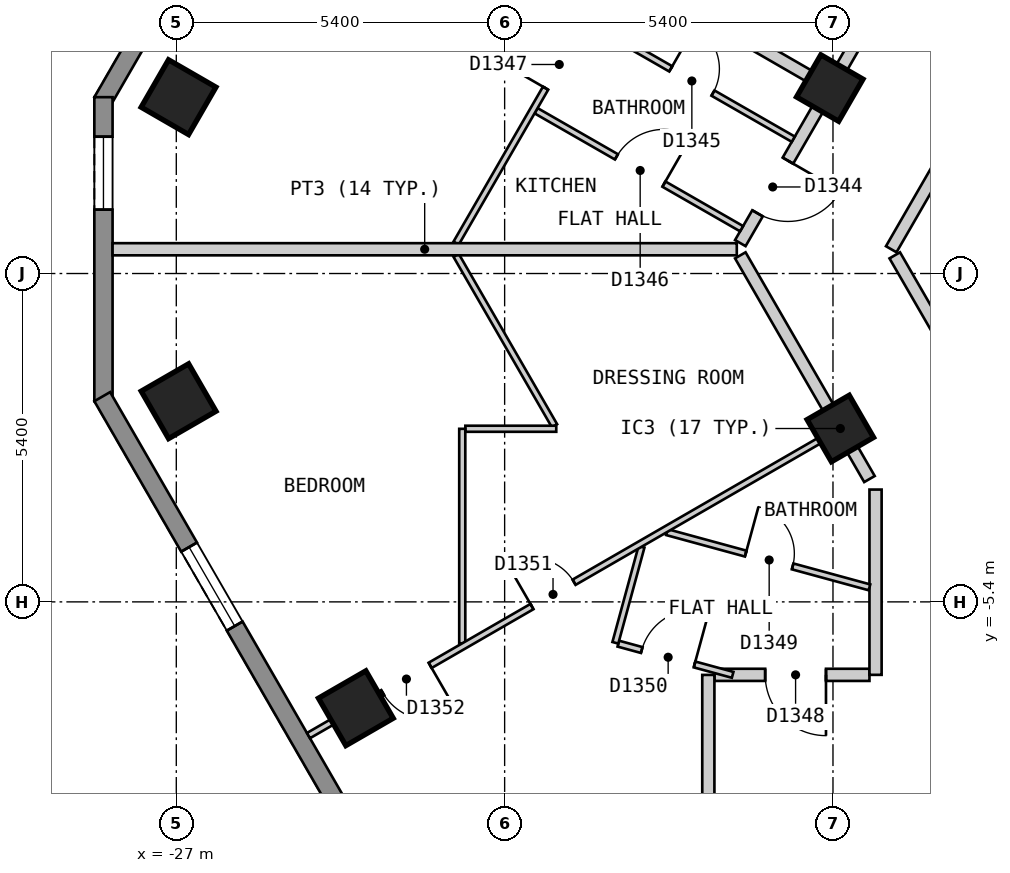
"""IFC4 building model, lengths in metres.
Left out: names, types, materials, properties, quantities, classifications, styles, units other than length and angle.
Written with IfcOpenShell. Run it as: python <this file> out.ifc"""

import sys

from ifc_helpers import new_model, si_unit, direction, frame, frame_2d, origin, origin_2d, place, context, subcontext, project, spatial, polyline, rectangle, outline, extrude, element, fill, save


model = new_model("IFC4")
c1 = context("Model", 3, precision=1e-05, world=origin(), true_north=direction((0.0, 1.0)))
c2 = subcontext(c1, "Body", "Model", "MODEL_VIEW")
j1 = project(units=[si_unit("LENGTHUNIT", "METRE"), si_unit("PLANEANGLEUNIT", "RADIAN")], contexts=[c1])
p1 = place(None, origin())
s1 = spatial("IfcSite", under=j1, at=p1, CompositionType="ELEMENT")
p2 = place(p1, origin())
s2 = spatial("IfcBuilding", under=s1, at=p2, CompositionType="ELEMENT")
p3 = place(p2, frame((0.0, 0.0, 147.6)))
s3 = spatial("IfcBuildingStorey", under=s2, at=p3, CompositionType="ELEMENT", Elevation=147.6)
for number, where, z_axis, x_axis in (
    (1, (-26.963, 2.9, 0.0), (0.0, 0.0, 1.0), (-0.5, -0.866, 0.0)),
    (2, (-26.962, -2.1, 0.0), (0.0, 0.0, 1.0), (0.5, -0.866, 0.0)),
    (3, (-24.047, -7.149, 0.0), (0.0, 0.0, 1.0), (0.5, -0.866, 0.0)),
):
    element("IfcColumn", number, at=place(p3, frame(where, z_axis=z_axis, x_axis=x_axis)), inside=s3, PredefinedType="COLUMN", context=c2, shape_type="SweptSolid", body=[
        extrude(rectangle(XDim=0.9, YDim=0.9, at=origin_2d()), origin(), (0.0, 0.0, 1.0), 3.0),
    ])
for number, where, z_axis, x_axis in (
    (4, (-16.079, -2.549, 0.0), (0.0, 0.0, 1.0), (0.5, -0.866, 0.0)),
    (5, (-16.253, 3.05, 0.0), (0.0, 0.0, 1.0), (-0.5, -0.866, 0.0)),
):
    element("IfcColumn", number, at=place(p3, frame(where, z_axis=z_axis, x_axis=x_axis)), inside=s3, PredefinedType="COLUMN", context=c2, shape_type="SweptSolid", body=[
        extrude(rectangle(XDim=0.8, YDim=0.8, at=origin_2d()), origin(), (0.0, 0.0, 1.0), 3.0),
    ])
p4 = place(p3, frame((-16.555, 23.025, 0.0), z_axis=(0.0, 0.0, 1.0), x_axis=(-0.500020536353, -0.866013546791, 0.0)))
e6 = element("IfcWall", 6, at=p4, inside=s3, PredefinedType="SOLIDWALL", context=c2, shape_type="SweptSolid", body=[
    extrude(outline(polyline([(0.0, -0.15), (23.325, -0.15), (23.245, 0.15), (0.08, 0.15), (0.0, -0.15)])), origin(), (0.0, 0.0, 1.0), 2.7),
])
p5 = place(p4, frame((2.685, 0.0, 0.15)))
e7 = element("IfcOpeningElement", 7, at=p5, cuts=e6, PredefinedType="OPENING", context=c2, shape_type="SweptSolid", body=[
    extrude(rectangle(XDim=1.5, YDim=2.1, at=frame_2d((0.75, 1.05))), frame((0.0, 0.16, 0.0), z_axis=(0.0, -1.0, 0.0), x_axis=(1.0, 0.0, 0.0)), (0.0, 0.0, 1.0), 0.32),
])
p6 = place(p4, frame((8.171, 0.0, 0.15)))
e8 = element("IfcOpeningElement", 8, at=p6, cuts=e6, PredefinedType="OPENING", context=c2, shape_type="SweptSolid", body=[
    extrude(rectangle(XDim=1.5, YDim=2.1, at=frame_2d((0.75, 1.05))), frame((0.0, 0.16, 0.0), z_axis=(0.0, -1.0, 0.0), x_axis=(1.0, 0.0, 0.0)), (0.0, 0.0, 1.0), 0.32),
])
p7 = place(p4, frame((13.655, 0.0, 0.15)))
e9 = element("IfcOpeningElement", 9, at=p7, cuts=e6, PredefinedType="OPENING", context=c2, shape_type="SweptSolid", body=[
    extrude(rectangle(XDim=1.5, YDim=2.1, at=frame_2d((0.75, 1.05))), frame((0.0, 0.16, 0.0), z_axis=(0.0, -1.0, 0.0), x_axis=(1.0, 0.0, 0.0)), (0.0, 0.0, 1.0), 0.32),
])
p8 = place(p4, frame((19.14, 0.0, 0.15)))
e10 = element("IfcOpeningElement", 10, at=p8, cuts=e6, PredefinedType="OPENING", context=c2, shape_type="SweptSolid", body=[
    extrude(rectangle(XDim=1.5, YDim=2.1, at=frame_2d((0.75, 1.05))), frame((0.0, 0.16, 0.0), z_axis=(0.0, -1.0, 0.0), x_axis=(1.0, 0.0, 0.0)), (0.0, 0.0, 1.0), 0.32),
])
p9 = place(p3, frame((-28.198, 2.9, 0.0), z_axis=(0.0, 0.0, 1.0), x_axis=(0.0, -1.0, 0.0)))
e11 = element("IfcWall", 11, at=p9, inside=s3, PredefinedType="SOLIDWALL", context=c2, shape_type="SweptSolid", body=[
    extrude(outline(polyline([(0.0, -0.15), (5.0, -0.15), (4.92, 0.15), (0.08, 0.15), (0.0, -0.15)])), origin(), (0.0, 0.0, 1.0), 2.7),
])
p10 = place(p9, frame((0.65, 0.0, 0.15)))
e12 = element("IfcOpeningElement", 12, at=p10, cuts=e11, PredefinedType="OPENING", context=c2, shape_type="SweptSolid", body=[
    extrude(rectangle(XDim=1.2, YDim=2.1, at=frame_2d((0.6, 1.05))), frame((0.0, 0.16, 0.0), z_axis=(0.0, -1.0, 0.0), x_axis=(1.0, 0.0, 0.0)), (0.0, 0.0, 1.0), 0.32),
])
p11 = place(p3, frame((-28.218, -2.025, 0.0), z_axis=(0.0, 0.0, 1.0), x_axis=(0.500017503135, -0.866015298109, 0.0)))
e13 = element("IfcWall", 13, at=p11, inside=s3, PredefinedType="SOLIDWALL", context=c2, shape_type="SweptSolid", body=[
    extrude(outline(polyline([(0.0, -0.15), (24.711, -0.15), (24.631, 0.15), (0.08, 0.15), (0.0, -0.15)])), origin(), (0.0, 0.0, 1.0), 2.7),
])
p12 = place(p11, frame((2.857, 0.0, 0.15)))
e14 = element("IfcOpeningElement", 14, at=p12, cuts=e13, PredefinedType="OPENING", context=c2, shape_type="SweptSolid", body=[
    extrude(rectangle(XDim=1.5, YDim=2.1, at=frame_2d((0.75, 1.05))), frame((0.0, 0.16, 0.0), z_axis=(0.0, -1.0, 0.0), x_axis=(1.0, 0.0, 0.0)), (0.0, 0.0, 1.0), 0.32),
])
p13 = place(p11, frame((8.689, 0.0, 0.15)))
e15 = element("IfcOpeningElement", 15, at=p13, cuts=e13, PredefinedType="OPENING", context=c2, shape_type="SweptSolid", body=[
    extrude(rectangle(XDim=1.5, YDim=2.1, at=frame_2d((0.75, 1.05))), frame((0.0, 0.16, 0.0), z_axis=(0.0, -1.0, 0.0), x_axis=(1.0, 0.0, 0.0)), (0.0, 0.0, 1.0), 0.32),
])
p14 = place(p11, frame((14.52, 0.0, 0.15)))
e16 = element("IfcOpeningElement", 16, at=p14, cuts=e13, PredefinedType="OPENING", context=c2, shape_type="SweptSolid", body=[
    extrude(rectangle(XDim=1.5, YDim=2.1, at=frame_2d((0.75, 1.05))), frame((0.0, 0.16, 0.0), z_axis=(0.0, -1.0, 0.0), x_axis=(1.0, 0.0, 0.0)), (0.0, 0.0, 1.0), 0.32),
])
p15 = place(p11, frame((20.351, 0.0, 0.15)))
e17 = element("IfcOpeningElement", 17, at=p15, cuts=e13, PredefinedType="OPENING", context=c2, shape_type="SweptSolid", body=[
    extrude(rectangle(XDim=1.5, YDim=2.1, at=frame_2d((0.75, 1.05))), frame((0.0, 0.16, 0.0), z_axis=(0.0, -1.0, 0.0), x_axis=(1.0, 0.0, 0.0)), (0.0, 0.0, 1.0), 0.32),
])
p16 = place(p3, frame((-15.184, 0.299, 0.0), z_axis=(0.0, 0.0, 1.0), x_axis=(0.500149577091, -0.865939028186, 0.0)))
e18 = element("IfcWall", 18, at=p16, inside=s3, PredefinedType="PARTITIONING", context=c2, shape_type="SweptSolid", body=[
    extrude(rectangle(XDim=3.463, YDim=0.2, at=frame_2d((1.732, 0.0))), origin(), (0.0, 0.0, 1.0), 2.7),
])
p17 = place(p3, frame((-17.724, 0.299, 0.0), z_axis=(0.0, 0.0, 1.0), x_axis=(0.499923815713, -0.866069384335, 0.0)))
e19 = element("IfcWall", 19, at=p17, inside=s3, PredefinedType="PARTITIONING", context=c2, shape_type="SweptSolid", body=[
    extrude(rectangle(XDim=3.289, YDim=0.2, at=frame_2d((1.644, 0.0))), origin(), (0.0, 0.0, 1.0), 2.7),
])
p18 = place(p3, frame((-16.02, -2.652, 0.0), z_axis=(0.0, 0.0, 1.0), x_axis=(0.499764376199, -0.866161398518, 0.0)))
e20 = element("IfcWall", 20, at=p18, inside=s3, PredefinedType="PARTITIONING", context=c2, shape_type="SweptSolid", body=[
    extrude(rectangle(XDim=0.84, YDim=0.2, at=frame_2d((0.42, 0.0))), origin(), (0.0, 0.0, 1.0), 2.7),
])
p19 = place(p3, frame((-18.149, -6.6, 0.0), z_axis=(0.0, 0.0, 1.0), x_axis=(1.0, 0.0, 0.0)))
e21 = element("IfcWall", 21, at=p19, inside=s3, PredefinedType="PARTITIONING", context=c2, shape_type="SweptSolid", body=[
    extrude(rectangle(XDim=2.549, YDim=0.2, at=frame_2d((1.274, 0.0))), origin(), (0.0, 0.0, 1.0), 2.7),
])
p20 = place(p19, frame((0.834, 0.0, 0.0)))
e22 = element("IfcOpeningElement", 22, at=p20, cuts=e21, PredefinedType="OPENING", context=c2, shape_type="SweptSolid", body=[
    extrude(rectangle(XDim=1.0, YDim=2.1, at=frame_2d((0.5, 1.05))), frame((0.0, 0.11, 0.0), z_axis=(0.0, -1.0, 0.0), x_axis=(1.0, 0.0, 0.0)), (0.0, 0.0, 1.0), 0.22),
])
p21 = place(p3, frame((-15.242, 0.399, 0.0), z_axis=(0.0, 0.0, 1.0), x_axis=(0.499953615651, 0.866052182145, 0.0)))
e23 = element("IfcWall", 23, at=p21, inside=s3, PredefinedType="PARTITIONING", context=c2, shape_type="SweptSolid", body=[
    extrude(rectangle(XDim=8.777, YDim=0.2, at=frame_2d((4.388, 0.0))), origin(), (0.0, 0.0, 1.0), 2.7),
])
p22 = place(p21, frame((3.938, 0.0, 0.0)))
e24 = element("IfcOpeningElement", 24, at=p22, cuts=e23, PredefinedType="OPENING", context=c2, shape_type="SweptSolid", body=[
    extrude(rectangle(XDim=0.9, YDim=2.1, at=frame_2d((0.45, 1.05))), frame((0.0, 0.11, 0.0), z_axis=(0.0, -1.0, 0.0), x_axis=(1.0, 0.0, 0.0)), (0.0, 0.0, 1.0), 0.22),
])
p23 = place(p3, frame((-17.724, 0.5, 0.0), z_axis=(0.0, 0.0, 1.0), x_axis=(0.499994801602, 0.86602840506, 0.0)))
e25 = element("IfcWall", 25, at=p23, inside=s3, PredefinedType="PARTITIONING", context=c2, shape_type="SweptSolid", body=[
    extrude(rectangle(XDim=16.916, YDim=0.2, at=frame_2d((8.458, 0.0))), origin(), (0.0, 0.0, 1.0), 2.7),
])
p24 = place(p23, frame((10.672, 0.0, 0.0)))
e26 = element("IfcOpeningElement", 26, at=p24, cuts=e25, PredefinedType="OPENING", context=c2, shape_type="SweptSolid", body=[
    extrude(rectangle(XDim=1.0, YDim=2.1, at=frame_2d((0.5, 1.05))), frame((0.0, 0.11, 0.0), z_axis=(0.0, -1.0, 0.0), x_axis=(1.0, 0.0, 0.0)), (0.0, 0.0, 1.0), 0.22),
])
p25 = place(p23, frame((5.187, 0.0, 0.0)))
e27 = element("IfcOpeningElement", 27, at=p25, cuts=e25, PredefinedType="OPENING", context=c2, shape_type="SweptSolid", body=[
    extrude(rectangle(XDim=1.0, YDim=2.1, at=frame_2d((0.5, 1.05))), frame((0.0, 0.11, 0.0), z_axis=(0.0, -1.0, 0.0), x_axis=(1.0, 0.0, 0.0)), (0.0, 0.0, 1.0), 0.22),
])
p26 = place(p23, frame((0.566, 0.0, 0.0)))
e28 = element("IfcOpeningElement", 28, at=p26, cuts=e25, PredefinedType="OPENING", context=c2, shape_type="SweptSolid", body=[
    extrude(rectangle(XDim=1.0, YDim=2.1, at=frame_2d((0.5, 1.05))), frame((0.0, 0.11, 0.0), z_axis=(0.0, -1.0, 0.0), x_axis=(1.0, 0.0, 0.0)), (0.0, 0.0, 1.0), 0.22),
])
p27 = place(p3, frame((-15.5, -6.6, 0.0), z_axis=(0.0, 0.0, 1.0), x_axis=(0.0, 1.0, 0.0)))
e29 = element("IfcWall", 29, at=p27, inside=s3, PredefinedType="PARTITIONING", context=c2, shape_type="SweptSolid", body=[
    extrude(rectangle(XDim=3.047, YDim=0.2, at=frame_2d((1.523, 0.0))), origin(), (0.0, 0.0, 1.0), 2.7),
])
p28 = place(p3, frame((-18.25, -16.4, 0.0), z_axis=(0.0, 0.0, 1.0), x_axis=(0.0, 1.0, 0.0)))
e30 = element("IfcWall", 30, at=p28, inside=s3, PredefinedType="PARTITIONING", context=c2, shape_type="SweptSolid", body=[
    extrude(rectangle(XDim=9.799, YDim=0.2, at=frame_2d((4.899, 0.0))), origin(), (0.0, 0.0, 1.0), 2.7),
])
p29 = place(p28, frame((2.485, 0.0, 0.0)))
e31 = element("IfcOpeningElement", 31, at=p29, cuts=e30, PredefinedType="OPENING", context=c2, shape_type="SweptSolid", body=[
    extrude(rectangle(XDim=0.8, YDim=2.1, at=frame_2d((0.4, 1.05))), frame((0.0, 0.11, 0.0), z_axis=(0.0, -1.0, 0.0), x_axis=(1.0, 0.0, 0.0)), (0.0, 0.0, 1.0), 0.22),
])
p30 = place(p3, frame((-22.398, 0.299, 0.0), z_axis=(0.0, 0.0, 1.0), x_axis=(0.50004249738, -0.86600086652, 0.0)))
e32 = element("IfcWall", 32, at=p30, inside=s3, PredefinedType="PARTITIONING", context=c2, shape_type="SweptSolid", body=[
    extrude(rectangle(XDim=3.236, YDim=0.1, at=frame_2d((1.618, 0.0))), origin(), (0.0, 0.0, 1.0), 2.7),
])
p31 = place(p3, frame((-18.931, -4.253, 0.0), z_axis=(0.0, 0.0, 1.0), x_axis=(0.96479645258, -0.262997728296, 0.0)))
e33 = element("IfcWall", 33, at=p31, inside=s3, PredefinedType="PARTITIONING", context=c2, shape_type="SweptSolid", body=[
    extrude(rectangle(XDim=3.452, YDim=0.1, at=frame_2d((1.726, 0.0))), origin(), (0.0, 0.0, 1.0), 2.7),
])
p32 = place(p31, frame((1.343, 0.0, 0.0)))
e34 = element("IfcOpeningElement", 34, at=p32, cuts=e33, PredefinedType="OPENING", context=c2, shape_type="SweptSolid", body=[
    extrude(rectangle(XDim=0.8, YDim=2.1, at=frame_2d((0.4, 1.05))), frame((0.0, 0.06, 0.0), z_axis=(0.0, -1.0, 0.0), x_axis=(1.0, 0.0, 0.0)), (0.0, 0.0, 1.0), 0.12),
])
p33 = place(p3, frame((-19.73, -6.087, 0.0), z_axis=(0.0, 0.0, 1.0), x_axis=(0.964700186442, -0.263350622325, 0.0)))
e35 = element("IfcWall", 35, at=p33, inside=s3, PredefinedType="PARTITIONING", context=c2, shape_type="SweptSolid", body=[
    extrude(rectangle(XDim=1.949, YDim=0.1, at=frame_2d((0.974, 0.0))), origin(), (0.0, 0.0, 1.0), 2.7),
])
p34 = place(p33, frame((0.399, 0.0, 0.0)))
e36 = element("IfcOpeningElement", 36, at=p34, cuts=e35, PredefinedType="OPENING", context=c2, shape_type="SweptSolid", body=[
    extrude(rectangle(XDim=0.9, YDim=2.1, at=frame_2d((0.45, 1.05))), frame((0.0, 0.06, 0.0), z_axis=(0.0, -1.0, 0.0), x_axis=(1.0, 0.0, 0.0)), (0.0, 0.0, 1.0), 0.12),
])
p35 = place(p3, frame((-20.233, 4.149, 0.0), z_axis=(0.0, 0.0, 1.0), x_axis=(0.867293167797, -0.497797711016, 0.0)))
e37 = element("IfcWall", 37, at=p35, inside=s3, PredefinedType="PARTITIONING", context=c2, shape_type="SweptSolid", body=[
    extrude(rectangle(XDim=3.897, YDim=0.1, at=frame_2d((1.948, 0.0))), origin(), (0.0, 0.0, 1.0), 2.7),
])
p36 = place(p35, frame((1.574, 0.0, 0.0)))
e38 = element("IfcOpeningElement", 38, at=p36, cuts=e37, PredefinedType="OPENING", context=c2, shape_type="SweptSolid", body=[
    extrude(rectangle(XDim=0.8, YDim=2.1, at=frame_2d((0.4, 1.05))), frame((0.0, 0.06, 0.0), z_axis=(0.0, -1.0, 0.0), x_axis=(1.0, 0.0, 0.0)), (0.0, 0.0, 1.0), 0.12),
])
p37 = place(p3, frame((-21.083, 2.677, 0.0), z_axis=(0.0, 0.0, 1.0), x_axis=(0.867308690764, -0.497770664991, 0.0)))
e39 = element("IfcWall", 39, at=p37, inside=s3, PredefinedType="PARTITIONING", context=c2, shape_type="SweptSolid", body=[
    extrude(rectangle(XDim=3.897, YDim=0.1, at=frame_2d((1.949, 0.0))), origin(), (0.0, 0.0, 1.0), 2.7),
])
p38 = place(p37, frame((1.524, 0.0, 0.0)))
e40 = element("IfcOpeningElement", 40, at=p38, cuts=e39, PredefinedType="OPENING", context=c2, shape_type="SweptSolid", body=[
    extrude(rectangle(XDim=0.9, YDim=2.1, at=frame_2d((0.45, 1.05))), frame((0.0, 0.06, 0.0), z_axis=(0.0, -1.0, 0.0), x_axis=(1.0, 0.0, 0.0)), (0.0, 0.0, 1.0), 0.12),
])
p39 = place(p3, frame((-22.246, -2.553, 0.0), z_axis=(0.0, 0.0, 1.0), x_axis=(1.0, 0.0, 0.0)))
e41 = element("IfcWall", 41, at=p39, inside=s3, PredefinedType="PARTITIONING", context=c2, shape_type="SweptSolid", body=[
    extrude(rectangle(XDim=1.495, YDim=0.1, at=frame_2d((0.748, 0.0))), origin(), (0.0, 0.0, 1.0), 2.7),
])
p40 = place(p3, frame((-22.398, 0.499, 0.0), z_axis=(0.0, 0.0, 1.0), x_axis=(0.499984806807, 0.866034175401, 0.0)))
e42 = element("IfcWall", 42, at=p40, inside=s3, PredefinedType="PARTITIONING", context=c2, shape_type="SweptSolid", body=[
    extrude(rectangle(XDim=5.182, YDim=0.1, at=frame_2d((2.591, 0.0))), origin(), (0.0, 0.0, 1.0), 2.7),
])
p41 = place(p40, frame((2.943, 0.0, 0.0)))
e43 = element("IfcOpeningElement", 43, at=p41, cuts=e42, PredefinedType="OPENING", context=c2, shape_type="SweptSolid", body=[
    extrude(rectangle(XDim=0.9, YDim=2.1, at=frame_2d((0.45, 1.05))), frame((0.0, 0.06, 0.0), z_axis=(0.0, -1.0, 0.0), x_axis=(1.0, 0.0, 0.0)), (0.0, 0.0, 1.0), 0.12),
])
p42 = place(p3, frame((-19.779, -6.073, 0.0), z_axis=(0.0, 0.0, 1.0), x_axis=(0.262700832967, 0.964877335395, 0.0)))
e44 = element("IfcWall", 44, at=p42, inside=s3, PredefinedType="PARTITIONING", context=c2, shape_type="SweptSolid", body=[
    extrude(rectangle(XDim=1.636, YDim=0.1, at=frame_2d((0.818, 0.0))), origin(), (0.0, 0.0, 1.0), 2.7),
])
p43 = place(p3, frame((-22.297, -6.081, 0.0), z_axis=(0.0, 0.0, 1.0), x_axis=(0.0, 1.0, 0.0)))
e45 = element("IfcWall", 45, at=p43, inside=s3, PredefinedType="PARTITIONING", context=c2, shape_type="SweptSolid", body=[
    extrude(rectangle(XDim=3.527, YDim=0.1, at=frame_2d((1.764, 0.0))), origin(), (0.0, 0.0, 1.0), 2.7),
])
p44 = place(p3, frame((-24.826, -7.599, 0.0), z_axis=(0.0, 0.0, 1.0), x_axis=(0.866020686789, 0.500008169986, 0.0)))
e46 = element("IfcWall", 46, at=p44, inside=s3, PredefinedType="PARTITIONING", context=c2, shape_type="SweptSolid", body=[
    extrude(rectangle(XDim=10.01, YDim=0.1, at=frame_2d((5.005, 0.0))), origin(), (0.0, 0.0, 1.0), 2.7),
])
p45 = place(p44, frame((4.244, 0.0, 0.0)))
e47 = element("IfcOpeningElement", 47, at=p45, cuts=e46, PredefinedType="OPENING", context=c2, shape_type="SweptSolid", body=[
    extrude(rectangle(XDim=0.8, YDim=2.1, at=frame_2d((0.4, 1.05))), frame((0.0, 0.06, 0.0), z_axis=(0.0, -1.0, 0.0), x_axis=(1.0, 0.0, 0.0)), (0.0, 0.0, 1.0), 0.12),
])
p46 = place(p44, frame((1.41, 0.0, 0.0)))
e48 = element("IfcOpeningElement", 48, at=p46, cuts=e46, PredefinedType="OPENING", context=c2, shape_type="SweptSolid", body=[
    extrude(rectangle(XDim=0.9, YDim=2.1, at=frame_2d((0.45, 1.05))), frame((0.0, 0.06, 0.0), z_axis=(0.0, -1.0, 0.0), x_axis=(1.0, 0.0, 0.0)), (0.0, 0.0, 1.0), 0.12),
])
p47 = place(p3, frame((-24.999, 8.1, 0.0), z_axis=(0.0, 0.0, 1.0), x_axis=(0.866016855193, -0.500014806302, 0.0)))
e49 = element("IfcWall", 49, at=p47, inside=s3, PredefinedType="PARTITIONING", context=c2, shape_type="SweptSolid", body=[
    extrude(rectangle(XDim=10.0, YDim=0.2, at=frame_2d((5.0, 0.0))), origin(), (0.0, 0.0, 1.0), 2.7),
])
p48 = place(p3, frame((-28.048, 0.399, 0.0), z_axis=(0.0, 0.0, 1.0), x_axis=(1.0, 0.0, 0.0)))
e50 = element("IfcWall", 50, at=p48, inside=s3, PredefinedType="PARTITIONING", context=c2, shape_type="SweptSolid", body=[
    extrude(rectangle(XDim=10.266, YDim=0.2, at=frame_2d((5.133, 0.0))), origin(), (0.0, 0.0, 1.0), 2.7),
])
p49 = place(p10, origin())
e51 = element("IfcWindow", 51, at=p49, inside=s3, PartitioningType="SINGLE_PANEL", PredefinedType="WINDOW", context=c2, shape_type="SweptSolid", body=[
    extrude(rectangle(XDim=1.2, YDim=2.1, at=frame_2d((0.6, 1.05))), frame((0.0, 0.03, 0.0), z_axis=(0.0, -1.0, 0.0), x_axis=(1.0, 0.0, 0.0)), (0.0, 0.0, 1.0), 0.06),
])
fill(e12, e51)
p50 = place(p12, origin())
e52 = element("IfcWindow", 52, at=p50, inside=s3, PartitioningType="SINGLE_PANEL", PredefinedType="WINDOW", context=c2, shape_type="SweptSolid", body=[
    extrude(rectangle(XDim=1.5, YDim=2.1, at=frame_2d((0.75, 1.05))), frame((0.0, 0.03, 0.0), z_axis=(0.0, -1.0, 0.0), x_axis=(1.0, 0.0, 0.0)), (0.0, 0.0, 1.0), 0.06),
])
fill(e14, e52)
p51 = place(p26, origin())
e53 = element("IfcDoor", 53, at=p51, inside=s3, OperationType="SINGLE_SWING_RIGHT", PredefinedType="DOOR", context=c2, shape_type="SweptSolid", body=[
    extrude(rectangle(XDim=1.0, YDim=2.1, at=frame_2d((0.5, 1.05))), frame((0.0, 0.025, 0.0), z_axis=(0.0, -1.0, 0.0), x_axis=(1.0, 0.0, 0.0)), (0.0, 0.0, 1.0), 0.05),
])
fill(e28, e53)
p52 = place(p36, origin())
e54 = element("IfcDoor", 54, at=p52, inside=s3, OperationType="SINGLE_SWING_LEFT", PredefinedType="DOOR", context=c2, shape_type="SweptSolid", body=[
    extrude(rectangle(XDim=0.8, YDim=2.1, at=frame_2d((0.4, 1.05))), frame((0.0, 0.025, 0.0), z_axis=(0.0, -1.0, 0.0), x_axis=(1.0, 0.0, 0.0)), (0.0, 0.0, 1.0), 0.05),
])
fill(e38, e54)
p53 = place(p38, origin())
e55 = element("IfcDoor", 55, at=p53, inside=s3, OperationType="SINGLE_SWING_RIGHT", PredefinedType="DOOR", context=c2, shape_type="SweptSolid", body=[
    extrude(rectangle(XDim=0.9, YDim=2.1, at=frame_2d((0.45, 1.05))), frame((0.0, 0.025, 0.0), z_axis=(0.0, -1.0, 0.0), x_axis=(1.0, 0.0, 0.0)), (0.0, 0.0, 1.0), 0.05),
])
fill(e40, e55)
p54 = place(p41, origin())
e56 = element("IfcDoor", 56, at=p54, inside=s3, OperationType="SINGLE_SWING_LEFT", PredefinedType="DOOR", context=c2, shape_type="SweptSolid", body=[
    extrude(rectangle(XDim=0.9, YDim=2.1, at=frame_2d((0.45, 1.05))), frame((0.0, 0.025, 0.0), z_axis=(0.0, -1.0, 0.0), x_axis=(1.0, 0.0, 0.0)), (0.0, 0.0, 1.0), 0.05),
])
fill(e43, e56)
p55 = place(p20, origin())
e57 = element("IfcDoor", 57, at=p55, inside=s3, OperationType="SINGLE_SWING_RIGHT", PredefinedType="DOOR", context=c2, shape_type="SweptSolid", body=[
    extrude(rectangle(XDim=1.0, YDim=2.1, at=frame_2d((0.5, 1.05))), frame((0.0, 0.025, 0.0), z_axis=(0.0, -1.0, 0.0), x_axis=(1.0, 0.0, 0.0)), (0.0, 0.0, 1.0), 0.05),
])
fill(e22, e57)
p56 = place(p32, origin())
e58 = element("IfcDoor", 58, at=p56, inside=s3, OperationType="SINGLE_SWING_LEFT", PredefinedType="DOOR", context=c2, shape_type="SweptSolid", body=[
    extrude(rectangle(XDim=0.8, YDim=2.1, at=frame_2d((0.4, 1.05))), frame((0.0, 0.025, 0.0), z_axis=(0.0, -1.0, 0.0), x_axis=(1.0, 0.0, 0.0)), (0.0, 0.0, 1.0), 0.05),
])
fill(e34, e58)
p57 = place(p34, origin())
e59 = element("IfcDoor", 59, at=p57, inside=s3, OperationType="SINGLE_SWING_RIGHT", PredefinedType="DOOR", context=c2, shape_type="SweptSolid", body=[
    extrude(rectangle(XDim=0.9, YDim=2.1, at=frame_2d((0.45, 1.05))), frame((0.0, 0.025, 0.0), z_axis=(0.0, -1.0, 0.0), x_axis=(1.0, 0.0, 0.0)), (0.0, 0.0, 1.0), 0.05),
])
fill(e36, e59)
p58 = place(p45, origin())
e60 = element("IfcDoor", 60, at=p58, inside=s3, OperationType="SINGLE_SWING_LEFT", PredefinedType="DOOR", context=c2, shape_type="SweptSolid", body=[
    extrude(rectangle(XDim=0.8, YDim=2.1, at=frame_2d((0.4, 1.05))), frame((0.0, 0.025, 0.0), z_axis=(0.0, -1.0, 0.0), x_axis=(1.0, 0.0, 0.0)), (0.0, 0.0, 1.0), 0.05),
])
fill(e47, e60)
p59 = place(p46, origin())
e61 = element("IfcDoor", 61, at=p59, inside=s3, OperationType="SINGLE_SWING_RIGHT", PredefinedType="DOOR", context=c2, shape_type="SweptSolid", body=[
    extrude(rectangle(XDim=0.9, YDim=2.1, at=frame_2d((0.45, 1.05))), frame((0.0, 0.025, 0.0), z_axis=(0.0, -1.0, 0.0), x_axis=(1.0, 0.0, 0.0)), (0.0, 0.0, 1.0), 0.05),
])
fill(e48, e61)
save(model, sys.argv[1])
